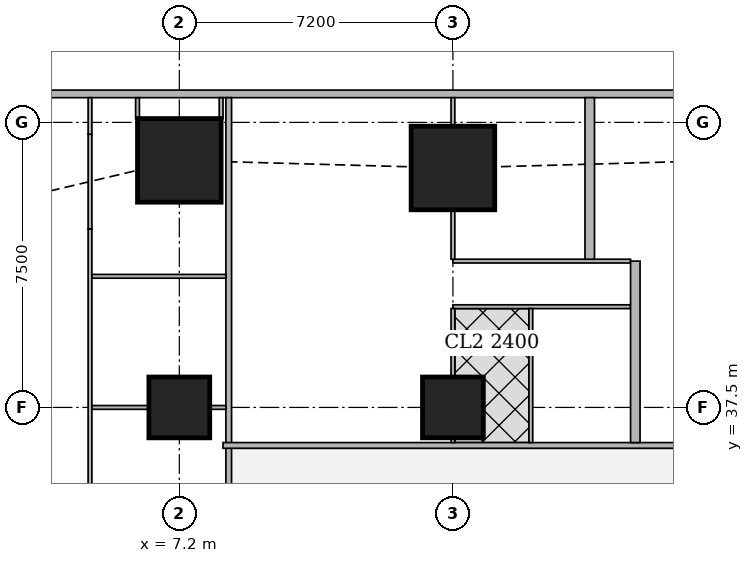
"""IFC4 building model, lengths in metres.
Left out: names, types, materials, properties, quantities, classifications, styles, units other than length and angle.
Written with IfcOpenShell. Run it as: python <this file> out.ifc"""

import sys

from ifc_helpers import new_model, si_unit, direction, frame, frame_2d, origin, origin_2d, place, context, subcontext, project, spatial, rectangle, extrude, element, fill, save


model = new_model("IFC4")
c1 = context("Model", 3, precision=1e-05, world=origin(), true_north=direction((0.0, 1.0)))
c2 = subcontext(c1, "Body", "Model", "MODEL_VIEW")
j1 = project(units=[si_unit("LENGTHUNIT", "METRE"), si_unit("PLANEANGLEUNIT", "RADIAN")], contexts=[c1])
p1 = place(None, origin())
s1 = spatial("IfcSite", under=j1, at=p1, CompositionType="ELEMENT")
p2 = place(p1, origin())
s2 = spatial("IfcBuilding", under=s1, at=p2, CompositionType="ELEMENT")
p3 = place(p2, frame((0.0, 0.0, 111.65)))
s3 = spatial("IfcBuildingStorey", under=s2, at=p3, CompositionType="ELEMENT", Elevation=111.65)
for number, where, z_axis, x_axis in (
    (1, (7.2, 37.5, 0.0), (0.0, 0.0, 1.0), (1.0, 0.0, 0.0)),
    (2, (14.4, 37.5, 0.0), (0.0, 0.0, 1.0), (1.0, 0.0, 0.0)),
):
    element("IfcColumn", number, at=place(p3, frame(where, z_axis=z_axis, x_axis=x_axis)), inside=s3, PredefinedType="COLUMN", context=c2, shape_type="SweptSolid", body=[
        extrude(rectangle(XDim=1.6, YDim=1.6, at=origin_2d()), origin(), (0.0, 0.0, 1.0), 3.75),
    ])
for number, where, z_axis, x_axis in (
    (3, (7.2, 44.0, 0.0), (0.0, 0.0, 1.0), (1.0, 0.0, 0.0)),
    (4, (14.4, 43.8, 0.0), (0.0, 0.0, 1.0), (1.0, 0.0, 0.0)),
):
    element("IfcColumn", number, at=place(p3, frame(where, z_axis=z_axis, x_axis=x_axis)), inside=s3, PredefinedType="COLUMN", context=c2, shape_type="SweptSolid", body=[
        extrude(rectangle(XDim=2.2, YDim=2.2, at=origin_2d()), origin(), (0.0, 0.0, 1.0), 3.75),
    ])
p4 = place(p3, frame((40.106, 45.75, 0.0), z_axis=(0.0, 0.0, 1.0), x_axis=(-1.0, 0.0, 0.0)))
e5 = element("IfcWall", 5, at=p4, inside=s3, PredefinedType="SOLIDWALL", context=c2, shape_type="SweptSolid", body=[
    extrude(rectangle(XDim=37.943, YDim=0.2, at=frame_2d((18.971, 0.0))), origin(), (0.0, 0.0, 1.0), 3.5),
])
p5 = place(p4, frame((8.606, 0.0, 0.9)))
e6 = element("IfcOpeningElement", 6, at=p5, cuts=e5, PredefinedType="OPENING", context=c2, shape_type="SweptSolid", body=[
    extrude(rectangle(XDim=1.8, YDim=1.5, at=frame_2d((0.9, 0.75))), frame((0.0, 0.11, 0.0), z_axis=(0.0, -1.0, 0.0), x_axis=(1.0, 0.0, 0.0)), (0.0, 0.0, 1.0), 0.22),
])
p6 = place(p4, frame((12.206, 0.0, 0.9)))
e7 = element("IfcOpeningElement", 7, at=p6, cuts=e5, PredefinedType="OPENING", context=c2, shape_type="SweptSolid", body=[
    extrude(rectangle(XDim=1.8, YDim=1.5, at=frame_2d((0.9, 0.75))), frame((0.0, 0.11, 0.0), z_axis=(0.0, -1.0, 0.0), x_axis=(1.0, 0.0, 0.0)), (0.0, 0.0, 1.0), 0.22),
])
p7 = place(p4, frame((15.806, 0.0, 0.9)))
e8 = element("IfcOpeningElement", 8, at=p7, cuts=e5, PredefinedType="OPENING", context=c2, shape_type="SweptSolid", body=[
    extrude(rectangle(XDim=1.8, YDim=1.5, at=frame_2d((0.9, 0.75))), frame((0.0, 0.11, 0.0), z_axis=(0.0, -1.0, 0.0), x_axis=(1.0, 0.0, 0.0)), (0.0, 0.0, 1.0), 0.22),
])
p8 = place(p4, frame((19.406, 0.0, 0.9)))
e9 = element("IfcOpeningElement", 9, at=p8, cuts=e5, PredefinedType="OPENING", context=c2, shape_type="SweptSolid", body=[
    extrude(rectangle(XDim=1.8, YDim=1.5, at=frame_2d((0.9, 0.75))), frame((0.0, 0.11, 0.0), z_axis=(0.0, -1.0, 0.0), x_axis=(1.0, 0.0, 0.0)), (0.0, 0.0, 1.0), 0.22),
])
p9 = place(p4, frame((23.006, 0.0, 0.9)))
e10 = element("IfcOpeningElement", 10, at=p9, cuts=e5, PredefinedType="OPENING", context=c2, shape_type="SweptSolid", body=[
    extrude(rectangle(XDim=1.8, YDim=1.5, at=frame_2d((0.9, 0.75))), frame((0.0, 0.11, 0.0), z_axis=(0.0, -1.0, 0.0), x_axis=(1.0, 0.0, 0.0)), (0.0, 0.0, 1.0), 0.22),
])
p10 = place(p4, frame((26.606, 0.0, 0.9)))
e11 = element("IfcOpeningElement", 11, at=p10, cuts=e5, PredefinedType="OPENING", context=c2, shape_type="SweptSolid", body=[
    extrude(rectangle(XDim=1.8, YDim=1.5, at=frame_2d((0.9, 0.75))), frame((0.0, 0.11, 0.0), z_axis=(0.0, -1.0, 0.0), x_axis=(1.0, 0.0, 0.0)), (0.0, 0.0, 1.0), 0.22),
])
p11 = place(p3, frame((8.5, -0.65, 0.0), z_axis=(0.0, 0.0, 1.0), x_axis=(0.0, 1.0, 0.0)))
e12 = element("IfcWall", 12, at=p11, inside=s3, PredefinedType="SOLIDWALL", context=c2, shape_type="SweptSolid", body=[
    extrude(rectangle(XDim=46.3, YDim=0.15, at=frame_2d((23.15, 0.0))), origin(), (0.0, 0.0, 1.0), 2.2),
])
p12 = place(p11, frame((9.525, 0.0, 0.0)))
e13 = element("IfcOpeningElement", 13, at=p12, cuts=e12, PredefinedType="OPENING", context=c2, shape_type="SweptSolid", body=[
    extrude(rectangle(XDim=1.0, YDim=2.1, at=frame_2d((0.5, 1.05))), frame((0.0, 0.085, 0.0), z_axis=(0.0, -1.0, 0.0), x_axis=(1.0, 0.0, 0.0)), (0.0, 0.0, 1.0), 0.17),
])
p13 = place(p11, frame((13.275, 0.0, 0.0)))
e14 = element("IfcOpeningElement", 14, at=p13, cuts=e12, PredefinedType="OPENING", context=c2, shape_type="SweptSolid", body=[
    extrude(rectangle(XDim=1.0, YDim=2.1, at=frame_2d((0.5, 1.05))), frame((0.0, 0.085, 0.0), z_axis=(0.0, -1.0, 0.0), x_axis=(1.0, 0.0, 0.0)), (0.0, 0.0, 1.0), 0.17),
])
p14 = place(p11, frame((25.15, 0.0, 0.0)))
e15 = element("IfcOpeningElement", 15, at=p14, cuts=e12, PredefinedType="OPENING", context=c2, shape_type="SweptSolid", body=[
    extrude(rectangle(XDim=1.0, YDim=2.1, at=frame_2d((0.5, 1.05))), frame((0.0, 0.085, 0.0), z_axis=(0.0, -1.0, 0.0), x_axis=(1.0, 0.0, 0.0)), (0.0, 0.0, 1.0), 0.17),
])
p15 = place(p3, frame((8.35, 36.5, 0.0), z_axis=(0.0, 0.0, 1.0), x_axis=(1.0, 0.0, 0.0)))
e16 = element("IfcWall", 16, at=p15, inside=s3, PredefinedType="SOLIDWALL", context=c2, shape_type="SweptSolid", body=[
    extrude(rectangle(XDim=26.415, YDim=0.15, at=frame_2d((13.208, 0.0))), origin(), (0.0, 0.0, 1.0), 3.5),
])
p16 = place(p15, frame((2.6, 0.0, 0.0)))
e17 = element("IfcOpeningElement", 17, at=p16, cuts=e16, PredefinedType="OPENING", context=c2, shape_type="SweptSolid", body=[
    extrude(rectangle(XDim=1.0, YDim=2.1, at=frame_2d((0.5, 1.05))), frame((0.0, 0.085, 0.0), z_axis=(0.0, -1.0, 0.0), x_axis=(1.0, 0.0, 0.0)), (0.0, 0.0, 1.0), 0.17),
])
p17 = place(p15, frame((10.949, 0.0, 0.0)))
e18 = element("IfcOpeningElement", 18, at=p17, cuts=e16, PredefinedType="OPENING", context=c2, shape_type="SweptSolid", body=[
    extrude(rectangle(XDim=1.0, YDim=2.1, at=frame_2d((0.5, 1.05))), frame((0.0, 0.085, 0.0), z_axis=(0.0, -1.0, 0.0), x_axis=(1.0, 0.0, 0.0)), (0.0, 0.0, 1.0), 0.17),
])
p18 = place(p15, frame((23.923, 0.0, 0.0)))
e19 = element("IfcOpeningElement", 19, at=p18, cuts=e16, PredefinedType="OPENING", context=c2, shape_type="SweptSolid", body=[
    extrude(rectangle(XDim=1.0, YDim=2.1, at=frame_2d((0.5, 1.05))), frame((0.0, 0.085, 0.0), z_axis=(0.0, -1.0, 0.0), x_axis=(1.0, 0.0, 0.0)), (0.0, 0.0, 1.0), 0.17),
])
for number, where, z_axis, x_axis in (
    (20, (6.1, 45.1, 0.0), (0.0, 0.0, 1.0), (0.0, 1.0, 0.0)),
    (21, (8.3, 45.65, 0.0), (0.0, 0.0, 1.0), (0.0, -1.0, 0.0)),
):
    element("IfcWall", number, at=place(p3, frame(where, z_axis=z_axis, x_axis=x_axis)), inside=s3, PredefinedType="PARTITIONING", context=c2, shape_type="SweptSolid", body=[
        extrude(rectangle(XDim=0.55, YDim=0.1, at=frame_2d((0.275, 0.0))), origin(), (0.0, 0.0, 1.0), 3.5),
    ])
p19 = place(p3, frame((4.85, 27.499, 0.0), z_axis=(0.0, 0.0, 1.0), x_axis=(0.0, 1.0, 0.0)))
e22 = element("IfcWall", 22, at=p19, inside=s3, PredefinedType="PARTITIONING", context=c2, shape_type="SweptSolid", body=[
    extrude(rectangle(XDim=14.7, YDim=0.1, at=frame_2d((7.35, 0.0))), origin(), (0.0, 0.0, 1.0), 3.5),
])
p20 = place(p19, frame((0.8, 0.0, 0.0)))
e23 = element("IfcOpeningElement", 23, at=p20, cuts=e22, PredefinedType="OPENING", context=c2, shape_type="SweptSolid", body=[
    extrude(rectangle(XDim=0.9, YDim=2.1, at=frame_2d((0.45, 1.05))), frame((0.0, 0.06, 0.0), z_axis=(0.0, -1.0, 0.0), x_axis=(1.0, 0.0, 0.0)), (0.0, 0.0, 1.0), 0.12),
])
p21 = place(p19, frame((2.901, 0.0, 0.0)))
e24 = element("IfcOpeningElement", 24, at=p21, cuts=e22, PredefinedType="OPENING", context=c2, shape_type="SweptSolid", body=[
    extrude(rectangle(XDim=0.9, YDim=2.1, at=frame_2d((0.45, 1.05))), frame((0.0, 0.06, 0.0), z_axis=(0.0, -1.0, 0.0), x_axis=(1.0, 0.0, 0.0)), (0.0, 0.0, 1.0), 0.12),
])
p22 = place(p19, frame((8.3, 0.0, 0.0)))
e25 = element("IfcOpeningElement", 25, at=p22, cuts=e22, PredefinedType="OPENING", context=c2, shape_type="SweptSolid", body=[
    extrude(rectangle(XDim=0.9, YDim=2.1, at=frame_2d((0.45, 1.05))), frame((0.0, 0.06, 0.0), z_axis=(0.0, -1.0, 0.0), x_axis=(1.0, 0.0, 0.0)), (0.0, 0.0, 1.0), 0.12),
])
p23 = place(p19, frame((12.05, 0.0, 0.0)))
e26 = element("IfcOpeningElement", 26, at=p23, cuts=e22, PredefinedType="OPENING", context=c2, shape_type="SweptSolid", body=[
    extrude(rectangle(XDim=0.9, YDim=2.1, at=frame_2d((0.45, 1.05))), frame((0.0, 0.06, 0.0), z_axis=(0.0, -1.0, 0.0), x_axis=(1.0, 0.0, 0.0)), (0.0, 0.0, 1.0), 0.12),
])
p24 = place(p19, frame((5.4, 0.0, 0.0)))
e27 = element("IfcOpeningElement", 27, at=p24, cuts=e22, PredefinedType="OPENING", context=c2, shape_type="SweptSolid", body=[
    extrude(rectangle(XDim=0.9, YDim=2.1, at=frame_2d((0.45, 1.05))), frame((0.0, 0.06, 0.0), z_axis=(0.0, -1.0, 0.0), x_axis=(1.0, 0.0, 0.0)), (0.0, 0.0, 1.0), 0.12),
])
p25 = place(p3, frame((4.85, 42.199, 0.0), z_axis=(0.0, 0.0, 1.0), x_axis=(0.0, 1.0, 0.0)))
e28 = element("IfcWall", 28, at=p25, inside=s3, PredefinedType="PARTITIONING", context=c2, shape_type="SweptSolid", body=[
    extrude(rectangle(XDim=2.49, YDim=0.1, at=frame_2d((1.245, 0.0))), origin(), (0.0, 0.0, 1.0), 2.05),
])
p26 = place(p3, frame((4.85, 44.689, 0.0), z_axis=(0.0, 0.0, 1.0), x_axis=(0.0, 1.0, 0.0)))
e29 = element("IfcWall", 29, at=p26, inside=s3, PredefinedType="PARTITIONING", context=c2, shape_type="SweptSolid", body=[
    extrude(rectangle(XDim=0.961, YDim=0.1, at=frame_2d((0.48, 0.0))), origin(), (0.0, 0.0, 1.0), 3.5),
])
p27 = place(p3, frame((4.9, 37.5, 0.0), z_axis=(0.0, 0.0, 1.0), x_axis=(1.0, 0.0, 0.0)))
e30 = element("IfcWall", 30, at=p27, inside=s3, PredefinedType="PARTITIONING", context=c2, shape_type="SweptSolid", body=[
    extrude(rectangle(XDim=1.499, YDim=0.1, at=frame_2d((0.75, 0.0))), origin(), (0.0, 0.0, 1.0), 3.5),
])
p28 = place(p3, frame((8.001, 37.5, 0.0), z_axis=(0.0, 0.0, 1.0), x_axis=(1.0, 0.0, 0.0)))
e31 = element("IfcWall", 31, at=p28, inside=s3, PredefinedType="PARTITIONING", context=c2, shape_type="SweptSolid", body=[
    extrude(rectangle(XDim=0.424, YDim=0.1, at=frame_2d((0.212, 0.0))), origin(), (0.0, 0.0, 1.0), 3.5),
])
p29 = place(p3, frame((14.4, 41.35, 0.0), z_axis=(0.0, 0.0, 1.0), x_axis=(1.0, 0.0, 0.0)))
e32 = element("IfcWall", 32, at=p29, inside=s3, PredefinedType="PARTITIONING", context=c2, shape_type="SweptSolid", body=[
    extrude(rectangle(XDim=4.674, YDim=0.1, at=frame_2d((2.337, 0.0))), origin(), (0.0, 0.0, 1.0), 3.5),
])
p30 = place(p29, frame((0.2, 0.0, 0.0)))
e33 = element("IfcOpeningElement", 33, at=p30, cuts=e32, PredefinedType="OPENING", context=c2, shape_type="SweptSolid", body=[
    extrude(rectangle(XDim=0.9, YDim=2.1, at=frame_2d((0.45, 1.05))), frame((0.0, 0.06, 0.0), z_axis=(0.0, -1.0, 0.0), x_axis=(1.0, 0.0, 0.0)), (0.0, 0.0, 1.0), 0.12),
])
p31 = place(p3, frame((14.4, 40.15, 0.0), z_axis=(0.0, 0.0, 1.0), x_axis=(1.0, 0.0, 0.0)))
e34 = element("IfcWall", 34, at=p31, inside=s3, PredefinedType="PARTITIONING", context=c2, shape_type="SweptSolid", body=[
    extrude(rectangle(XDim=4.674, YDim=0.1, at=frame_2d((2.337, 0.0))), origin(), (0.0, 0.0, 1.0), 3.5),
])
p32 = place(p31, frame((0.575, 0.0, 0.0)))
e35 = element("IfcOpeningElement", 35, at=p32, cuts=e34, PredefinedType="OPENING", context=c2, shape_type="SweptSolid", body=[
    extrude(rectangle(XDim=0.9, YDim=2.1, at=frame_2d((0.45, 1.05))), frame((0.0, 0.06, 0.0), z_axis=(0.0, -1.0, 0.0), x_axis=(1.0, 0.0, 0.0)), (0.0, 0.0, 1.0), 0.12),
])
p33 = place(p31, frame((2.975, 0.0, 0.0)))
e36 = element("IfcOpeningElement", 36, at=p33, cuts=e34, PredefinedType="OPENING", context=c2, shape_type="SweptSolid", body=[
    extrude(rectangle(XDim=0.9, YDim=2.1, at=frame_2d((0.45, 1.05))), frame((0.0, 0.06, 0.0), z_axis=(0.0, -1.0, 0.0), x_axis=(1.0, 0.0, 0.0)), (0.0, 0.0, 1.0), 0.12),
])
p34 = place(p3, frame((14.4, 41.4, 0.0), z_axis=(0.0, 0.0, 1.0), x_axis=(0.0, 1.0, 0.0)))
e37 = element("IfcWall", 37, at=p34, inside=s3, PredefinedType="PARTITIONING", context=c2, shape_type="SweptSolid", body=[
    extrude(rectangle(XDim=1.299, YDim=0.1, at=frame_2d((0.649, 0.0))), origin(), (0.0, 0.0, 1.0), 3.5),
])
p35 = place(p3, frame((14.4, 44.901, 0.0), z_axis=(0.0, 0.0, 1.0), x_axis=(0.0, 1.0, 0.0)))
e38 = element("IfcWall", 38, at=p35, inside=s3, PredefinedType="PARTITIONING", context=c2, shape_type="SweptSolid", body=[
    extrude(rectangle(XDim=0.749, YDim=0.1, at=frame_2d((0.375, 0.0))), origin(), (0.0, 0.0, 1.0), 3.5),
])
p36 = place(p3, frame((14.4, 36.575, 0.0), z_axis=(0.0, 0.0, 1.0), x_axis=(0.0, 1.0, 0.0)))
e39 = element("IfcWall", 39, at=p36, inside=s3, PredefinedType="PARTITIONING", context=c2, shape_type="SweptSolid", body=[
    extrude(rectangle(XDim=0.124, YDim=0.1, at=frame_2d((0.062, 0.0))), origin(), (0.0, 0.0, 1.0), 3.5),
])
p37 = place(p3, frame((14.4, 38.301, 0.0), z_axis=(0.0, 0.0, 1.0), x_axis=(0.0, 1.0, 0.0)))
e40 = element("IfcWall", 40, at=p37, inside=s3, PredefinedType="PARTITIONING", context=c2, shape_type="SweptSolid", body=[
    extrude(rectangle(XDim=1.799, YDim=0.1, at=frame_2d((0.899, 0.0))), origin(), (0.0, 0.0, 1.0), 3.5),
])
p38 = place(p3, frame((16.45, 36.575, 0.0), z_axis=(0.0, 0.0, 1.0), x_axis=(0.0, 1.0, 0.0)))
e41 = element("IfcWall", 41, at=p38, inside=s3, PredefinedType="PARTITIONING", context=c2, shape_type="SweptSolid", body=[
    extrude(rectangle(XDim=3.525, YDim=0.1, at=frame_2d((1.763, 0.0))), origin(), (0.0, 0.0, 1.0), 3.5),
])
p39 = place(p3, frame((18.0, 41.4, 0.0), z_axis=(0.0, 0.0, 1.0), x_axis=(0.0, 1.0, 0.0)))
e42 = element("IfcWall", 42, at=p39, inside=s3, PredefinedType="SOLIDWALL", context=c2, shape_type="SweptSolid", body=[
    extrude(rectangle(XDim=4.25, YDim=0.25, at=frame_2d((2.125, 0.0))), origin(), (0.0, 0.0, 1.0), 2.2),
])
p40 = place(p3, frame((19.199, 36.575, 0.0), z_axis=(0.0, 0.0, 1.0), x_axis=(0.0, 1.0, 0.0)))
e43 = element("IfcWall", 43, at=p40, inside=s3, PredefinedType="SOLIDWALL", context=c2, shape_type="SweptSolid", body=[
    extrude(rectangle(XDim=4.775, YDim=0.25, at=frame_2d((2.388, 0.0))), origin(), (0.0, 0.0, 1.0), 3.5),
])
p41 = place(p3, frame((8.425, 40.95, 0.0), z_axis=(0.0, 0.0, 1.0), x_axis=(-1.0, 0.0, 0.0)))
e44 = element("IfcWall", 44, at=p41, inside=s3, PredefinedType="PARTITIONING", context=c2, shape_type="SweptSolid", body=[
    extrude(rectangle(XDim=3.525, YDim=0.1, at=frame_2d((1.763, 0.0))), origin(), (0.0, 0.0, 1.0), 3.5),
])
p42 = place(p41, frame((1.3, 0.0, 0.0)))
e45 = element("IfcOpeningElement", 45, at=p42, cuts=e44, PredefinedType="OPENING", context=c2, shape_type="SweptSolid", body=[
    extrude(rectangle(XDim=0.9, YDim=2.1, at=frame_2d((0.45, 1.05))), frame((0.0, 0.06, 0.0), z_axis=(0.0, -1.0, 0.0), x_axis=(1.0, 0.0, 0.0)), (0.0, 0.0, 1.0), 0.12),
])
p43 = place(p8, origin())
e46 = element("IfcWindow", 46, at=p43, inside=s3, PartitioningType="SINGLE_PANEL", PredefinedType="WINDOW", context=c2, shape_type="SweptSolid", body=[
    extrude(rectangle(XDim=1.8, YDim=1.5, at=frame_2d((0.9, 0.75))), frame((0.0, 0.03, 0.0), z_axis=(0.0, -1.0, 0.0), x_axis=(1.0, 0.0, 0.0)), (0.0, 0.0, 1.0), 0.06),
])
fill(e9, e46)
p44 = place(p9, origin())
e47 = element("IfcWindow", 47, at=p44, inside=s3, PartitioningType="SINGLE_PANEL", PredefinedType="WINDOW", context=c2, shape_type="SweptSolid", body=[
    extrude(rectangle(XDim=1.8, YDim=1.5, at=frame_2d((0.9, 0.75))), frame((0.0, 0.03, 0.0), z_axis=(0.0, -1.0, 0.0), x_axis=(1.0, 0.0, 0.0)), (0.0, 0.0, 1.0), 0.06),
])
fill(e10, e47)
p45 = place(p10, origin())
e48 = element("IfcWindow", 48, at=p45, inside=s3, PartitioningType="SINGLE_PANEL", PredefinedType="WINDOW", context=c2, shape_type="SweptSolid", body=[
    extrude(rectangle(XDim=1.8, YDim=1.5, at=frame_2d((0.9, 0.75))), frame((0.0, 0.03, 0.0), z_axis=(0.0, -1.0, 0.0), x_axis=(1.0, 0.0, 0.0)), (0.0, 0.0, 1.0), 0.06),
])
fill(e11, e48)
p46 = place(p22, origin())
e49 = element("IfcDoor", 49, at=p46, inside=s3, OperationType="SINGLE_SWING_RIGHT", PredefinedType="DOOR", context=c2, shape_type="SweptSolid", body=[
    extrude(rectangle(XDim=0.9, YDim=2.1, at=frame_2d((0.45, 1.05))), frame((0.0, 0.025, 0.0), z_axis=(0.0, -1.0, 0.0), x_axis=(1.0, 0.0, 0.0)), (0.0, 0.0, 1.0), 0.05),
])
fill(e25, e49)
p47 = place(p23, origin())
e50 = element("IfcDoor", 50, at=p47, inside=s3, OperationType="SINGLE_SWING_LEFT", PredefinedType="DOOR", context=c2, shape_type="SweptSolid", body=[
    extrude(rectangle(XDim=0.9, YDim=2.1, at=frame_2d((0.45, 1.05))), frame((0.0, 0.025, 0.0), z_axis=(0.0, -1.0, 0.0), x_axis=(1.0, 0.0, 0.0)), (0.0, 0.0, 1.0), 0.05),
])
fill(e26, e50)
p48 = place(p30, origin())
e51 = element("IfcDoor", 51, at=p48, inside=s3, OperationType="SINGLE_SWING_LEFT", PredefinedType="DOOR", context=c2, shape_type="SweptSolid", body=[
    extrude(rectangle(XDim=0.9, YDim=2.1, at=frame_2d((0.45, 1.05))), frame((0.0, 0.025, 0.0), z_axis=(0.0, -1.0, 0.0), x_axis=(1.0, 0.0, 0.0)), (0.0, 0.0, 1.0), 0.05),
])
fill(e33, e51)
p49 = place(p32, origin())
e52 = element("IfcDoor", 52, at=p49, inside=s3, OperationType="SINGLE_SWING_RIGHT", PredefinedType="DOOR", context=c2, shape_type="SweptSolid", body=[
    extrude(rectangle(XDim=0.9, YDim=2.1, at=frame_2d((0.45, 1.05))), frame((0.0, 0.025, 0.0), z_axis=(0.0, -1.0, 0.0), x_axis=(1.0, 0.0, 0.0)), (0.0, 0.0, 1.0), 0.05),
])
fill(e35, e52)
p50 = place(p33, origin())
e53 = element("IfcDoor", 53, at=p50, inside=s3, OperationType="SINGLE_SWING_LEFT", PredefinedType="DOOR", context=c2, shape_type="SweptSolid", body=[
    extrude(rectangle(XDim=0.9, YDim=2.1, at=frame_2d((0.45, 1.05))), frame((0.0, 0.025, 0.0), z_axis=(0.0, -1.0, 0.0), x_axis=(1.0, 0.0, 0.0)), (0.0, 0.0, 1.0), 0.05),
])
fill(e36, e53)
p51 = place(p16, origin())
e54 = element("IfcDoor", 54, at=p51, inside=s3, OperationType="SINGLE_SWING_LEFT", PredefinedType="DOOR", context=c2, shape_type="SweptSolid", body=[
    extrude(rectangle(XDim=1.0, YDim=2.1, at=frame_2d((0.5, 1.05))), frame((0.0, 0.025, 0.0), z_axis=(0.0, -1.0, 0.0), x_axis=(1.0, 0.0, 0.0)), (0.0, 0.0, 1.0), 0.05),
])
fill(e17, e54)
p52 = place(p17, origin())
e55 = element("IfcDoor", 55, at=p52, inside=s3, OperationType="SINGLE_SWING_LEFT", PredefinedType="DOOR", context=c2, shape_type="SweptSolid", body=[
    extrude(rectangle(XDim=1.0, YDim=2.1, at=frame_2d((0.5, 1.05))), frame((0.0, 0.025, 0.0), z_axis=(0.0, -1.0, 0.0), x_axis=(1.0, 0.0, 0.0)), (0.0, 0.0, 1.0), 0.05),
])
fill(e18, e55)
p53 = place(p42, origin())
e56 = element("IfcDoor", 56, at=p53, inside=s3, OperationType="SINGLE_SWING_LEFT", PredefinedType="DOOR", context=c2, shape_type="SweptSolid", body=[
    extrude(rectangle(XDim=0.9, YDim=2.1, at=frame_2d((0.45, 1.05))), frame((0.0, 0.025, 0.0), z_axis=(0.0, -1.0, 0.0), x_axis=(1.0, 0.0, 0.0)), (0.0, 0.0, 1.0), 0.05),
])
fill(e45, e56)
save(model, sys.argv[1])
